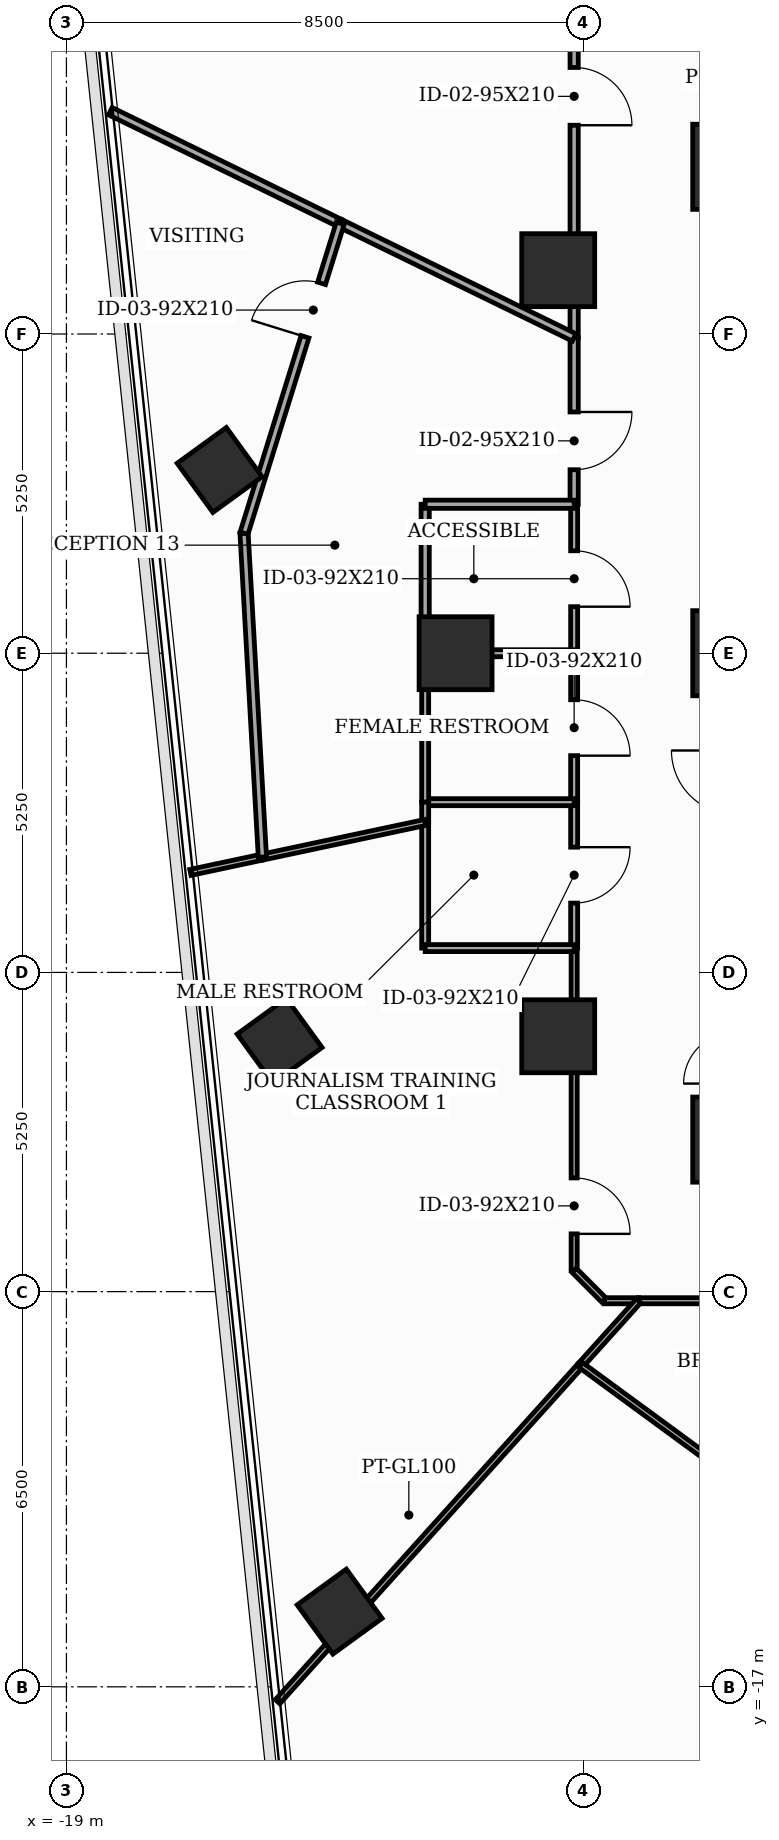
"""IFC4 building model, lengths in metres.
Left out: names, types, materials, properties, quantities, classifications, styles, units other than length and angle.
Written with IfcOpenShell. Run it as: python <this file> out.ifc"""

import sys

from ifc_helpers import new_model, si_unit, direction, frame, frame_2d, origin, origin_2d, place, context, subcontext, project, spatial, rectangle, extrude, element, fill, save


model = new_model("IFC4")
c1 = context("Model", 3, precision=1e-05, world=origin(), true_north=direction((0.0, 1.0)))
c2 = subcontext(c1, "Body", "Model", "MODEL_VIEW")
j1 = project(units=[si_unit("LENGTHUNIT", "METRE"), si_unit("PLANEANGLEUNIT", "RADIAN")], contexts=[c1])
p1 = place(None, origin())
s1 = spatial("IfcSite", under=j1, at=p1, CompositionType="ELEMENT")
p2 = place(p1, origin())
s2 = spatial("IfcBuilding", under=s1, at=p2, CompositionType="ELEMENT")
p3 = place(p2, frame((0.0, 0.0, 165.7)))
s3 = spatial("IfcBuildingStorey", under=s2, at=p3, CompositionType="ELEMENT", Elevation=165.7)
for number, where, z_axis, x_axis in (
    (1, (-8.0, -8.0, 0.0), (0.0, 0.0, 1.0), (1.0, 0.0, 0.0)),
    (2, (-8.0, 8.0, 0.0), (0.0, 0.0, 1.0), (1.0, 0.0, 0.0)),
    (3, (-8.0, 0.0, 0.0), (0.0, 0.0, 1.0), (1.0, 0.0, 0.0)),
):
    element("IfcColumn", number, at=place(p3, frame(where, z_axis=z_axis, x_axis=x_axis)), inside=s3, PredefinedType="COLUMN", context=c2, shape_type="SweptSolid", body=[
        extrude(rectangle(XDim=1.4, YDim=1.4, at=origin_2d()), origin(), (0.0, 0.0, 1.0), 3.7),
    ])
for number, where, z_axis, x_axis in (
    (4, (-10.912, 6.3, 0.0), (0.0, 0.0, 1.0), (1.0, 0.0, 0.0)),
    (5, (-12.6, 0.0, 0.0), (0.0, 0.0, 1.0), (1.0, 0.0, 0.0)),
    (6, (-10.912, -6.3, 0.0), (0.0, 0.0, 1.0), (1.0, 0.0, 0.0)),
):
    element("IfcColumn", number, at=place(p3, frame(where, z_axis=z_axis, x_axis=x_axis)), inside=s3, PredefinedType="COLUMN", context=c2, shape_type="SweptSolid", body=[
        extrude(rectangle(XDim=1.2, YDim=1.2, at=origin_2d()), origin(), (0.0, 0.0, 1.0), 3.7),
    ])
for number, where, z_axis, x_axis in (
    (7, (-16.481, 3.014, 0.0), (0.0, 0.0, 1.0), (0.809, 0.588, 0.0)),
    (8, (-15.494, -6.375, 0.0), (0.0, 0.0, 1.0), (0.809, 0.588, 0.0)),
    (9, (-14.507, -15.763, 0.0), (0.0, 0.0, 1.0), (0.809, 0.588, 0.0)),
):
    element("IfcColumn", number, at=place(p3, frame(where, z_axis=z_axis, x_axis=x_axis)), inside=s3, PredefinedType="COLUMN", context=c2, shape_type="SweptSolid", body=[
        extrude(rectangle(XDim=1.0, YDim=1.0, at=origin_2d()), origin(), (0.0, 0.0, 1.0), 3.7),
    ])
p4 = place(p3, frame((-10.65, 0.0, 0.0), z_axis=(0.0, 0.0, 1.0), x_axis=(0.0, -1.0, 0.0)))
e10 = element("IfcWall", 10, at=p4, inside=s3, PredefinedType="PARTITIONING", context=c2, shape_type="SweptSolid", body=[
    extrude(rectangle(XDim=2.45, YDim=0.115, at=frame_2d((1.225, 0.0))), origin(), (0.0, 0.0, 1.0), 2.885),
])
p5 = place(p4, frame((0.765, 0.0, 0.0)))
e11 = element("IfcOpeningElement", 11, at=p5, cuts=e10, PredefinedType="OPENING", context=c2, shape_type="SweptSolid", body=[
    extrude(rectangle(XDim=0.92, YDim=2.1, at=frame_2d((0.46, 1.05))), frame((0.0, 0.067, 0.0), z_axis=(0.0, -1.0, 0.0), x_axis=(1.0, 0.0, 0.0)), (0.0, 0.0, 1.0), 0.135),
])
p6 = place(p3, frame((-10.65, -2.45, 0.0), z_axis=(0.0, 0.0, 1.0), x_axis=(0.0, -1.0, 0.0)))
e12 = element("IfcWall", 12, at=p6, inside=s3, PredefinedType="PARTITIONING", context=c2, shape_type="SweptSolid", body=[
    extrude(rectangle(XDim=2.4, YDim=0.115, at=frame_2d((1.2, 0.0))), origin(), (0.0, 0.0, 1.0), 3.5),
])
p7 = place(p6, frame((0.74, 0.0, 0.0)))
e13 = element("IfcOpeningElement", 13, at=p7, cuts=e12, PredefinedType="OPENING", context=c2, shape_type="SweptSolid", body=[
    extrude(rectangle(XDim=0.92, YDim=2.1, at=frame_2d((0.46, 1.05))), frame((0.0, 0.067, 0.0), z_axis=(0.0, -1.0, 0.0), x_axis=(1.0, 0.0, 0.0)), (0.0, 0.0, 1.0), 0.135),
])
p8 = place(p3, frame((-10.65, -4.85, 0.0), z_axis=(0.0, 0.0, 1.0), x_axis=(0.0, -1.0, 0.0)))
e14 = element("IfcWall", 14, at=p8, inside=s3, PredefinedType="MOVABLE", context=c2, shape_type="SweptSolid", body=[
    extrude(rectangle(XDim=5.3, YDim=0.1, at=frame_2d((2.65, 0.0))), origin(), (0.0, 0.0, 1.0), 2.885),
])
p9 = place(p8, frame((3.78, 0.0, 0.0)))
e15 = element("IfcOpeningElement", 15, at=p9, cuts=e14, PredefinedType="OPENING", context=c2, shape_type="SweptSolid", body=[
    extrude(rectangle(XDim=0.92, YDim=2.1, at=frame_2d((0.46, 1.05))), frame((0.0, 0.06, 0.0), z_axis=(0.0, -1.0, 0.0), x_axis=(1.0, 0.0, 0.0)), (0.0, 0.0, 1.0), 0.12),
])
p10 = place(p3, frame((-10.65, -10.15, 0.0), z_axis=(0.0, 0.0, 1.0), x_axis=(0.707106781187, -0.707106781187, 0.0)))
e16 = element("IfcWall", 16, at=p10, inside=s3, PredefinedType="MOVABLE", context=c2, shape_type="SweptSolid", body=[
    extrude(rectangle(XDim=0.707, YDim=0.1, at=frame_2d((0.354, 0.0))), origin(), (0.0, 0.0, 1.0), 3.5),
])
p11 = place(p3, frame((-10.15, -10.65, 0.0), z_axis=(0.0, 0.0, 1.0), x_axis=(1.0, 0.0, 0.0)))
e17 = element("IfcWall", 17, at=p11, inside=s3, PredefinedType="MOVABLE", context=c2, shape_type="SweptSolid", body=[
    extrude(rectangle(XDim=0.561, YDim=0.1, at=frame_2d((0.28, 0.0))), origin(), (0.0, 0.0, 1.0), 3.5),
])
p12 = place(p3, frame((-9.589, -10.65, 0.0), z_axis=(0.0, 0.0, 1.0), x_axis=(1.0, 0.0, 0.0)))
e18 = element("IfcWall", 18, at=p12, inside=s3, PredefinedType="MOVABLE", context=c2, shape_type="SweptSolid", body=[
    extrude(rectangle(XDim=6.535, YDim=0.1, at=frame_2d((3.268, 0.0))), origin(), (0.0, 0.0, 1.0), 2.885),
])
p13 = place(p3, frame((-10.65, 10.15, 0.0), z_axis=(0.0, 0.0, 1.0), x_axis=(0.0, -1.0, 0.0)))
e19 = element("IfcWall", 19, at=p13, inside=s3, PredefinedType="PARTITIONING", context=c2, shape_type="SweptSolid", body=[
    extrude(rectangle(XDim=4.956, YDim=0.135, at=frame_2d((2.478, 0.0))), origin(), (0.0, 0.0, 1.0), 2.885),
])
p14 = place(p13, frame((0.516, 0.0, 0.0)))
e20 = element("IfcOpeningElement", 20, at=p14, cuts=e19, PredefinedType="OPENING", context=c2, shape_type="SweptSolid", body=[
    extrude(rectangle(XDim=0.95, YDim=2.1, at=frame_2d((0.475, 1.05))), frame((0.0, 0.077, 0.0), z_axis=(0.0, -1.0, 0.0), x_axis=(1.0, 0.0, 0.0)), (0.0, 0.0, 1.0), 0.155),
])
p15 = place(p3, frame((-10.65, 5.194, 0.0), z_axis=(0.0, 0.0, 1.0), x_axis=(0.0, -1.0, 0.0)))
e21 = element("IfcWall", 21, at=p15, inside=s3, PredefinedType="PARTITIONING", context=c2, shape_type="SweptSolid", body=[
    extrude(rectangle(XDim=2.744, YDim=0.135, at=frame_2d((1.372, 0.0))), origin(), (0.0, 0.0, 1.0), 3.5),
])
p16 = place(p15, frame((1.226, 0.0, 0.0)))
e22 = element("IfcOpeningElement", 22, at=p16, cuts=e21, PredefinedType="OPENING", context=c2, shape_type="SweptSolid", body=[
    extrude(rectangle(XDim=0.95, YDim=2.1, at=frame_2d((0.475, 1.05))), frame((0.0, 0.077, 0.0), z_axis=(0.0, -1.0, 0.0), x_axis=(1.0, 0.0, 0.0)), (0.0, 0.0, 1.0), 0.155),
])
p17 = place(p3, frame((-10.65, 2.45, 0.0), z_axis=(0.0, 0.0, 1.0), x_axis=(0.0, -1.0, 0.0)))
e23 = element("IfcWall", 23, at=p17, inside=s3, PredefinedType="PARTITIONING", context=c2, shape_type="SweptSolid", body=[
    extrude(rectangle(XDim=2.45, YDim=0.115, at=frame_2d((1.225, 0.0))), origin(), (0.0, 0.0, 1.0), 2.885),
])
p18 = place(p17, frame((0.765, 0.0, 0.0)))
e24 = element("IfcOpeningElement", 24, at=p18, cuts=e23, PredefinedType="OPENING", context=c2, shape_type="SweptSolid", body=[
    extrude(rectangle(XDim=0.92, YDim=2.1, at=frame_2d((0.46, 1.05))), frame((0.0, 0.067, 0.0), z_axis=(0.0, -1.0, 0.0), x_axis=(1.0, 0.0, 0.0)), (0.0, 0.0, 1.0), 0.135),
])
p19 = place(p3, frame((-13.1, -2.45, 0.0), z_axis=(0.0, 0.0, 1.0), x_axis=(1.0, 0.0, 0.0)))
e25 = element("IfcWall", 25, at=p19, inside=s3, PredefinedType="PARTITIONING", context=c2, shape_type="SweptSolid", body=[
    extrude(rectangle(XDim=2.45, YDim=0.115, at=frame_2d((1.225, 0.0))), origin(), (0.0, 0.0, 1.0), 2.885),
])
p20 = place(p3, frame((-13.1, 0.0, 0.0), z_axis=(0.0, 0.0, 1.0), x_axis=(0.0, -1.0, 0.0)))
e26 = element("IfcWall", 26, at=p20, inside=s3, PredefinedType="PARTITIONING", context=c2, shape_type="SweptSolid", body=[
    extrude(rectangle(XDim=2.45, YDim=0.115, at=frame_2d((1.225, 0.0))), origin(), (0.0, 0.0, 1.0), 3.5),
])
p21 = place(p3, frame((-10.65, 0.0, 0.0), z_axis=(0.0, 0.0, 1.0), x_axis=(-1.0, 0.0, 0.0)))
e27 = element("IfcWall", 27, at=p21, inside=s3, PredefinedType="PARTITIONING", context=c2, shape_type="SweptSolid", body=[
    extrude(rectangle(XDim=2.45, YDim=0.115, at=frame_2d((1.225, 0.0))), origin(), (0.0, 0.0, 1.0), 2.885),
])
p22 = place(p3, frame((-13.1, -2.784, 0.0), z_axis=(0.0, 0.0, 1.0), x_axis=(0.0, -1.0, 0.0)))
e28 = element("IfcWall", 28, at=p22, inside=s3, PredefinedType="PARTITIONING", context=c2, shape_type="SweptSolid", body=[
    extrude(rectangle(XDim=2.066, YDim=0.115, at=frame_2d((1.033, 0.0))), origin(), (0.0, 0.0, 1.0), 3.5),
])
p23 = place(p3, frame((-13.1, -4.85, 0.0), z_axis=(0.0, 0.0, 1.0), x_axis=(1.0, 0.0, 0.0)))
e29 = element("IfcWall", 29, at=p23, inside=s3, PredefinedType="PARTITIONING", context=c2, shape_type="SweptSolid", body=[
    extrude(rectangle(XDim=2.45, YDim=0.115, at=frame_2d((1.225, 0.0))), origin(), (0.0, 0.0, 1.0), 2.885),
])
p24 = place(p3, frame((-13.1, -2.45, 0.0), z_axis=(0.0, 0.0, 1.0), x_axis=(0.0, -1.0, 0.0)))
e30 = element("IfcWall", 30, at=p24, inside=s3, PredefinedType="PARTITIONING", context=c2, shape_type="SweptSolid", body=[
    extrude(rectangle(XDim=0.334, YDim=0.115, at=frame_2d((0.167, 0.0))), origin(), (0.0, 0.0, 1.0), 3.5),
])
p25 = place(p3, frame((-10.541, -11.707, 0.0), z_axis=(0.0, 0.0, 1.0), x_axis=(0.669154347467, 0.743123448201, 0.0)))
e31 = element("IfcWall", 31, at=p25, inside=s3, PredefinedType="MOVABLE", context=c2, shape_type="SweptSolid", body=[
    extrude(rectangle(XDim=1.423, YDim=0.1, at=frame_2d((0.711, 0.0))), origin(), (0.0, 0.0, 1.0), 3.5),
])
p26 = place(p3, frame((-15.528, -17.245, 0.0), z_axis=(0.0, 0.0, 1.0), x_axis=(0.669169234172, 0.74311004302, 0.0)))
e32 = element("IfcWall", 32, at=p26, inside=s3, PredefinedType="MOVABLE", context=c2, shape_type="SweptSolid", body=[
    extrude(rectangle(XDim=7.452, YDim=0.1, at=frame_2d((3.726, 0.0))), origin(), (0.0, 0.0, 1.0), 2.885),
])
p27 = place(p3, frame((-15.777, -3.353, 0.0), z_axis=(0.0, 0.0, 1.0), x_axis=(-0.978029023755, -0.208468771503, 0.0)))
e33 = element("IfcWall", 33, at=p27, inside=s3, PredefinedType="MOVABLE", context=c2, shape_type="SweptSolid", body=[
    extrude(rectangle(XDim=1.211, YDim=0.1, at=frame_2d((0.605, 0.0))), origin(), (0.0, 0.0, 1.0), 2.985),
])
p28 = place(p3, frame((-13.1, -2.784, 0.0), z_axis=(0.0, 0.0, 1.0), x_axis=(-0.978141843994, -0.207938772307, 0.0)))
e34 = element("IfcWall", 34, at=p28, inside=s3, PredefinedType="MOVABLE", context=c2, shape_type="SweptSolid", body=[
    extrude(rectangle(XDim=2.737, YDim=0.1, at=frame_2d((1.368, 0.0))), origin(), (0.0, 0.0, 1.0), 2.985),
])
p29 = place(p3, frame((-10.541, -11.707, 0.0), z_axis=(0.0, 0.0, 1.0), x_axis=(0.806504929698, -0.591227366055, 0.0)))
e35 = element("IfcWall", 35, at=p29, inside=s3, PredefinedType="MOVABLE", context=c2, shape_type="SweptSolid", body=[
    extrude(rectangle(XDim=3.572, YDim=0.1, at=frame_2d((1.786, 0.0))), origin(), (0.0, 0.0, 1.0), 2.885),
])
p30 = place(p3, frame((-18.277, 8.915, 0.0), z_axis=(0.0, 0.0, 1.0), x_axis=(0.898795221882, -0.43836873648, 0.0)))
e36 = element("IfcWall", 36, at=p30, inside=s3, PredefinedType="PARTITIONING", context=c2, shape_type="SweptSolid", body=[
    extrude(rectangle(XDim=4.206, YDim=0.135, at=frame_2d((2.103, 0.0))), origin(), (0.0, 0.0, 1.0), 2.985),
])
p31 = place(p3, frame((-14.497, 7.071, 0.0), z_axis=(0.0, 0.0, 1.0), x_axis=(0.89874213328, -0.438477568261, 0.0)))
e37 = element("IfcWall", 37, at=p31, inside=s3, PredefinedType="PARTITIONING", context=c2, shape_type="SweptSolid", body=[
    extrude(rectangle(XDim=4.281, YDim=0.135, at=frame_2d((2.14, 0.0))), origin(), (0.0, 0.0, 1.0), 2.885),
])
p32 = place(p3, frame((-15.777, -3.353, 0.0), z_axis=(0.0, 0.0, 1.0), x_axis=(-0.056600228811, 0.99839692212, 0.0)))
e38 = element("IfcWall", 38, at=p32, inside=s3, PredefinedType="PARTITIONING", context=c2, shape_type="SweptSolid", body=[
    extrude(rectangle(XDim=5.336, YDim=0.135, at=frame_2d((2.668, 0.0))), origin(), (0.0, 0.0, 1.0), 2.985),
])
p33 = place(p3, frame((-16.079, 1.974, 0.0), z_axis=(0.0, 0.0, 1.0), x_axis=(0.296438064518, 0.955052079158, 0.0)))
e39 = element("IfcWall", 39, at=p33, inside=s3, PredefinedType="PARTITIONING", context=c2, shape_type="SweptSolid", body=[
    extrude(rectangle(XDim=5.337, YDim=0.135, at=frame_2d((2.668, 0.0))), origin(), (0.0, 0.0, 1.0), 2.885),
])
p34 = place(p33, frame((3.383, 0.0, 0.0)))
e40 = element("IfcOpeningElement", 40, at=p34, cuts=e39, PredefinedType="OPENING", context=c2, shape_type="SweptSolid", body=[
    extrude(rectangle(XDim=0.92, YDim=2.1, at=frame_2d((0.46, 1.05))), frame((0.0, 0.077, 0.0), z_axis=(0.0, -1.0, 0.0), x_axis=(1.0, 0.0, 0.0)), (0.0, 0.0, 1.0), 0.155),
])
p35 = place(p3, frame((-13.1, 0.0, 0.0), z_axis=(0.0, 0.0, 1.0), x_axis=(0.0, 1.0, 0.0)))
e41 = element("IfcWall", 41, at=p35, inside=s3, PredefinedType="PARTITIONING", context=c2, shape_type="SweptSolid", body=[
    extrude(rectangle(XDim=2.45, YDim=0.135, at=frame_2d((1.225, 0.0))), origin(), (0.0, 0.0, 1.0), 2.885),
])
p36 = place(p3, frame((-13.1, 2.45, 0.0), z_axis=(0.0, 0.0, 1.0), x_axis=(1.0, 0.0, 0.0)))
e42 = element("IfcWall", 42, at=p36, inside=s3, PredefinedType="PARTITIONING", context=c2, shape_type="SweptSolid", body=[
    extrude(rectangle(XDim=2.45, YDim=0.135, at=frame_2d((1.225, 0.0))), origin(), (0.0, 0.0, 1.0), 2.885),
])
p37 = place(p5, origin())
e43 = element("IfcDoor", 43, at=p37, inside=s3, OperationType="SINGLE_SWING_RIGHT", PredefinedType="DOOR", context=c2, shape_type="SweptSolid", body=[
    extrude(rectangle(XDim=0.92, YDim=2.1, at=frame_2d((0.46, 1.05))), frame((0.0, 0.025, 0.0), z_axis=(0.0, -1.0, 0.0), x_axis=(1.0, 0.0, 0.0)), (0.0, 0.0, 1.0), 0.05),
])
fill(e11, e43)
p38 = place(p7, origin())
e44 = element("IfcDoor", 44, at=p38, inside=s3, OperationType="SINGLE_SWING_LEFT", PredefinedType="DOOR", context=c2, shape_type="SweptSolid", body=[
    extrude(rectangle(XDim=0.92, YDim=2.1, at=frame_2d((0.46, 1.05))), frame((0.0, 0.025, 0.0), z_axis=(0.0, -1.0, 0.0), x_axis=(1.0, 0.0, 0.0)), (0.0, 0.0, 1.0), 0.05),
])
fill(e13, e44)
p39 = place(p9, origin())
e45 = element("IfcDoor", 45, at=p39, inside=s3, OperationType="SINGLE_SWING_RIGHT", PredefinedType="DOOR", context=c2, shape_type="SweptSolid", body=[
    extrude(rectangle(XDim=0.92, YDim=2.1, at=frame_2d((0.46, 1.05))), frame((0.0, 0.025, 0.0), z_axis=(0.0, -1.0, 0.0), x_axis=(1.0, 0.0, 0.0)), (0.0, 0.0, 1.0), 0.05),
])
fill(e15, e45)
p40 = place(p14, origin())
e46 = element("IfcDoor", 46, at=p40, inside=s3, OperationType="SINGLE_SWING_RIGHT", PredefinedType="DOOR", context=c2, shape_type="SweptSolid", body=[
    extrude(rectangle(XDim=0.95, YDim=2.1, at=frame_2d((0.475, 1.05))), frame((0.0, 0.025, 0.0), z_axis=(0.0, -1.0, 0.0), x_axis=(1.0, 0.0, 0.0)), (0.0, 0.0, 1.0), 0.05),
])
fill(e20, e46)
p41 = place(p16, origin())
e47 = element("IfcDoor", 47, at=p41, inside=s3, OperationType="SINGLE_SWING_LEFT", PredefinedType="DOOR", context=c2, shape_type="SweptSolid", body=[
    extrude(rectangle(XDim=0.95, YDim=2.1, at=frame_2d((0.475, 1.05))), frame((0.0, 0.025, 0.0), z_axis=(0.0, -1.0, 0.0), x_axis=(1.0, 0.0, 0.0)), (0.0, 0.0, 1.0), 0.05),
])
fill(e22, e47)
p42 = place(p18, origin())
e48 = element("IfcDoor", 48, at=p42, inside=s3, OperationType="SINGLE_SWING_RIGHT", PredefinedType="DOOR", context=c2, shape_type="SweptSolid", body=[
    extrude(rectangle(XDim=0.92, YDim=2.1, at=frame_2d((0.46, 1.05))), frame((0.0, 0.025, 0.0), z_axis=(0.0, -1.0, 0.0), x_axis=(1.0, 0.0, 0.0)), (0.0, 0.0, 1.0), 0.05),
])
fill(e24, e48)
p43 = place(p34, origin())
e49 = element("IfcDoor", 49, at=p43, inside=s3, OperationType="SINGLE_SWING_LEFT", PredefinedType="DOOR", context=c2, shape_type="SweptSolid", body=[
    extrude(rectangle(XDim=0.92, YDim=2.1, at=frame_2d((0.46, 1.05))), frame((0.0, 0.025, 0.0), z_axis=(0.0, -1.0, 0.0), x_axis=(1.0, 0.0, 0.0)), (0.0, 0.0, 1.0), 0.05),
])
fill(e40, e49)
save(model, sys.argv[1])
